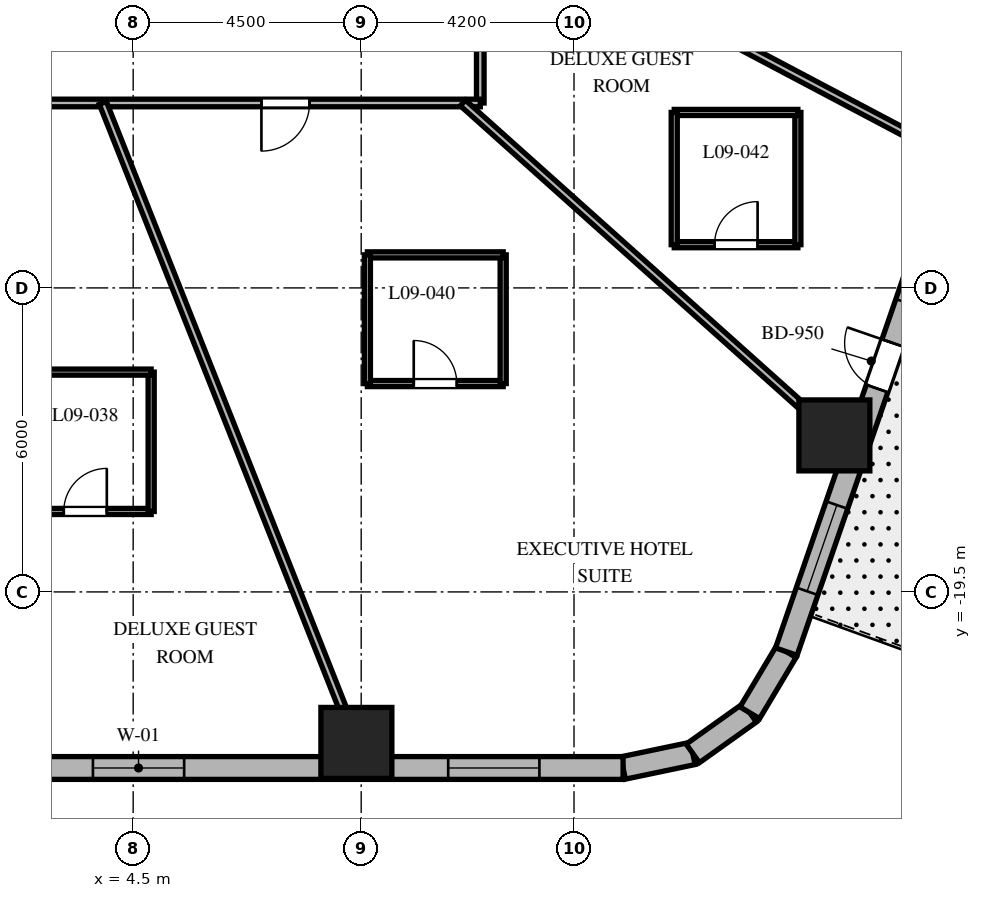
"""IFC4 building model, lengths in metres.
Left out: names, types, materials, properties, quantities, classifications, styles, units other than length and angle.
Written with IfcOpenShell. Run it as: python <this file> out.ifc"""

import sys

from ifc_helpers import new_model, si_unit, direction, frame, frame_2d, origin, origin_2d, place, context, subcontext, project, spatial, rectangle, extrude, element, fill, save


model = new_model("IFC4")
c1 = context("Model", 3, precision=1e-05, world=origin(), true_north=direction((0.0, 1.0)))
c2 = subcontext(c1, "Body", "Model", "MODEL_VIEW")
j1 = project(units=[si_unit("LENGTHUNIT", "METRE"), si_unit("PLANEANGLEUNIT", "RADIAN")], contexts=[c1])
p1 = place(None, origin())
s1 = spatial("IfcSite", under=j1, at=p1, CompositionType="ELEMENT")
p2 = place(p1, origin())
s2 = spatial("IfcBuilding", under=s1, at=p2, CompositionType="ELEMENT")
p3 = place(p2, frame((0.0, 0.0, 45.3)))
s3 = spatial("IfcBuildingStorey", under=s2, at=p3, CompositionType="ELEMENT", Elevation=45.3)
for number, where, z_axis, x_axis in (
    (1, (8.905, -22.48, 0.0), (0.0, 0.0, 1.0), (1.0, 0.0, 0.0)),
    (2, (18.338, -16.411, 0.0), (0.0, 0.0, 1.0), (1.0, 0.0, 0.0)),
):
    element("IfcColumn", number, at=place(p3, frame(where, z_axis=z_axis, x_axis=x_axis)), inside=s3, PredefinedType="COLUMN", context=c2, shape_type="SweptSolid", body=[
        extrude(rectangle(XDim=1.4, YDim=1.4, at=origin_2d()), origin(), (0.0, 0.0, 1.0), 3.7),
    ])
p4 = place(p3, frame((14.168, -22.975, 0.0), z_axis=(0.0, 0.0, 1.0), x_axis=(0.978770371074, 0.204959900243, 0.0)))
e3 = element("IfcWall", 3, at=p4, inside=s3, PredefinedType="SOLIDWALL", context=c2, shape_type="SweptSolid", body=[
    extrude(rectangle(XDim=1.406, YDim=0.45, at=frame_2d((0.703, 0.0))), origin(), (0.0, 0.0, 1.0), 3.4),
])
p5 = place(p3, frame((15.544, -22.687, 0.0), z_axis=(0.0, 0.0, 1.0), x_axis=(0.814210854316, 0.580569276412, 0.0)))
e4 = element("IfcWall", 4, at=p5, inside=s3, PredefinedType="SOLIDWALL", context=c2, shape_type="SweptSolid", body=[
    extrude(rectangle(XDim=1.381, YDim=0.45, at=frame_2d((0.691, 0.0))), origin(), (0.0, 0.0, 1.0), 3.4),
])
p6 = place(p3, frame((16.669, -21.885, 0.0), z_axis=(0.0, 0.0, 1.0), x_axis=(0.512936712947, 0.858426425799, 0.0)))
e5 = element("IfcWall", 5, at=p6, inside=s3, PredefinedType="SOLIDWALL", context=c2, shape_type="SweptSolid", body=[
    extrude(rectangle(XDim=1.406, YDim=0.45, at=frame_2d((0.703, 0.0))), origin(), (0.0, 0.0, 1.0), 3.4),
])
p7 = place(p3, frame((-12.221, -22.975, 0.0), z_axis=(0.0, 0.0, 1.0), x_axis=(1.0, 0.0, 0.0)))
e6 = element("IfcWall", 6, at=p7, inside=s3, PredefinedType="SOLIDWALL", context=c2, shape_type="SweptSolid", body=[
    extrude(rectangle(XDim=26.389, YDim=0.45, at=frame_2d((13.195, 0.0))), origin(), (0.0, 0.0, 1.0), 3.4),
])
p8 = place(p7, frame((1.653, 0.0, 0.8)))
e7 = element("IfcOpeningElement", 7, at=p8, cuts=e6, PredefinedType="OPENING", context=c2, shape_type="SweptSolid", body=[
    extrude(rectangle(XDim=1.8, YDim=1.8, at=frame_2d((0.9, 0.9))), frame((0.0, 0.235, 0.0), z_axis=(0.0, -1.0, 0.0), x_axis=(1.0, 0.0, 0.0)), (0.0, 0.0, 1.0), 0.47),
])
p9 = place(p7, frame((8.576, 0.0, 0.8)))
e8 = element("IfcOpeningElement", 8, at=p9, cuts=e6, PredefinedType="OPENING", context=c2, shape_type="SweptSolid", body=[
    extrude(rectangle(XDim=1.8, YDim=1.8, at=frame_2d((0.9, 0.9))), frame((0.0, 0.235, 0.0), z_axis=(0.0, -1.0, 0.0), x_axis=(1.0, 0.0, 0.0)), (0.0, 0.0, 1.0), 0.47),
])
p10 = place(p7, frame((15.927, 0.0, 0.8)))
e9 = element("IfcOpeningElement", 9, at=p10, cuts=e6, PredefinedType="OPENING", context=c2, shape_type="SweptSolid", body=[
    extrude(rectangle(XDim=1.8, YDim=1.8, at=frame_2d((0.9, 0.9))), frame((0.0, 0.235, 0.0), z_axis=(0.0, -1.0, 0.0), x_axis=(1.0, 0.0, 0.0)), (0.0, 0.0, 1.0), 0.47),
])
p11 = place(p7, frame((22.938, 0.0, 0.8)))
e10 = element("IfcOpeningElement", 10, at=p11, cuts=e6, PredefinedType="OPENING", context=c2, shape_type="SweptSolid", body=[
    extrude(rectangle(XDim=1.8, YDim=1.8, at=frame_2d((0.9, 0.9))), frame((0.0, 0.235, 0.0), z_axis=(0.0, -1.0, 0.0), x_axis=(1.0, 0.0, 0.0)), (0.0, 0.0, 1.0), 0.47),
])
p12 = place(p3, frame((17.39, -20.678, 0.0), z_axis=(0.0, 0.0, 1.0), x_axis=(0.326068018294, 0.945346310854, 0.0)))
e11 = element("IfcWall", 11, at=p12, inside=s3, PredefinedType="SOLIDWALL", context=c2, shape_type="SweptSolid", body=[
    extrude(rectangle(XDim=21.793, YDim=0.45, at=frame_2d((10.896, 0.0))), origin(), (0.0, 0.0, 1.0), 3.4),
])
p13 = place(p12, frame((5.493, 0.0, 0.0)))
e12 = element("IfcOpeningElement", 12, at=p13, cuts=e11, PredefinedType="OPENING", context=c2, shape_type="SweptSolid", body=[
    extrude(rectangle(XDim=0.95, YDim=2.15, at=frame_2d((0.475, 1.075))), frame((0.0, 0.235, 0.0), z_axis=(0.0, -1.0, 0.0), x_axis=(1.0, 0.0, 0.0)), (0.0, 0.0, 1.0), 0.47),
])
p14 = place(p12, frame((1.26, 0.0, 0.8)))
e13 = element("IfcOpeningElement", 13, at=p14, cuts=e11, PredefinedType="OPENING", context=c2, shape_type="SweptSolid", body=[
    extrude(rectangle(XDim=1.8, YDim=1.8, at=frame_2d((0.9, 0.9))), frame((0.0, 0.235, 0.0), z_axis=(0.0, -1.0, 0.0), x_axis=(1.0, 0.0, 0.0)), (0.0, 0.0, 1.0), 0.47),
])
p15 = place(p12, frame((7.283, 0.0, 0.8)))
e14 = element("IfcOpeningElement", 14, at=p15, cuts=e11, PredefinedType="OPENING", context=c2, shape_type="SweptSolid", body=[
    extrude(rectangle(XDim=1.8, YDim=1.8, at=frame_2d((0.9, 0.9))), frame((0.0, 0.235, 0.0), z_axis=(0.0, -1.0, 0.0), x_axis=(1.0, 0.0, 0.0)), (0.0, 0.0, 1.0), 0.47),
])
p16 = place(p12, frame((12.736, 0.0, 0.8)))
e15 = element("IfcOpeningElement", 15, at=p16, cuts=e11, PredefinedType="OPENING", context=c2, shape_type="SweptSolid", body=[
    extrude(rectangle(XDim=1.8, YDim=1.8, at=frame_2d((0.9, 0.9))), frame((0.0, 0.235, 0.0), z_axis=(0.0, -1.0, 0.0), x_axis=(1.0, 0.0, 0.0)), (0.0, 0.0, 1.0), 0.47),
])
p17 = place(p12, frame((18.68, 0.0, 0.8)))
e16 = element("IfcOpeningElement", 16, at=p17, cuts=e11, PredefinedType="OPENING", context=c2, shape_type="SweptSolid", body=[
    extrude(rectangle(XDim=1.8, YDim=1.8, at=frame_2d((0.9, 0.9))), frame((0.0, 0.235, 0.0), z_axis=(0.0, -1.0, 0.0), x_axis=(1.0, 0.0, 0.0)), (0.0, 0.0, 1.0), 0.47),
])
p18 = place(p3, frame((11.35, 9.85, 0.0), z_axis=(0.0, 0.0, 1.0), x_axis=(0.0, -1.0, 0.0)))
e17 = element("IfcWall", 17, at=p18, inside=s3, PredefinedType="PARTITIONING", context=c2, shape_type="SweptSolid", body=[
    extrude(rectangle(XDim=19.7, YDim=0.15, at=frame_2d((9.85, 0.0))), origin(), (0.0, 0.0, 1.0), 2.84),
])
p19 = place(p18, frame((7.571, 0.0, 0.0)))
e18 = element("IfcOpeningElement", 18, at=p19, cuts=e17, PredefinedType="OPENING", context=c2, shape_type="SweptSolid", body=[
    extrude(rectangle(XDim=0.95, YDim=2.03, at=frame_2d((0.475, 1.015))), frame((0.0, 0.085, 0.0), z_axis=(0.0, -1.0, 0.0), x_axis=(1.0, 0.0, 0.0)), (0.0, 0.0, 1.0), 0.17),
])
p20 = place(p18, frame((3.024, 0.0, 0.0)))
e19 = element("IfcOpeningElement", 19, at=p20, cuts=e17, PredefinedType="OPENING", context=c2, shape_type="SweptSolid", body=[
    extrude(rectangle(XDim=0.95, YDim=2.03, at=frame_2d((0.475, 1.015))), frame((0.0, 0.085, 0.0), z_axis=(0.0, -1.0, 0.0), x_axis=(1.0, 0.0, 0.0)), (0.0, 0.0, 1.0), 0.17),
])
p21 = place(p18, frame((17.181, 0.0, 0.0)))
e20 = element("IfcOpeningElement", 20, at=p21, cuts=e17, PredefinedType="OPENING", context=c2, shape_type="SweptSolid", body=[
    extrude(rectangle(XDim=0.95, YDim=2.03, at=frame_2d((0.475, 1.015))), frame((0.0, 0.085, 0.0), z_axis=(0.0, -1.0, 0.0), x_axis=(1.0, 0.0, 0.0)), (0.0, 0.0, 1.0), 0.17),
])
p22 = place(p18, frame((13.403, 0.0, 0.0)))
e21 = element("IfcOpeningElement", 21, at=p22, cuts=e17, PredefinedType="OPENING", context=c2, shape_type="SweptSolid", body=[
    extrude(rectangle(XDim=0.95, YDim=2.03, at=frame_2d((0.475, 1.015))), frame((0.0, 0.085, 0.0), z_axis=(0.0, -1.0, 0.0), x_axis=(1.0, 0.0, 0.0)), (0.0, 0.0, 1.0), 0.17),
])
p23 = place(p18, frame((10.134, 0.0, 0.0)))
e22 = element("IfcOpeningElement", 22, at=p23, cuts=e17, PredefinedType="OPENING", context=c2, shape_type="SweptSolid", body=[
    extrude(rectangle(XDim=0.95, YDim=2.03, at=frame_2d((0.475, 1.015))), frame((0.0, 0.085, 0.0), z_axis=(0.0, -1.0, 0.0), x_axis=(1.0, 0.0, 0.0)), (0.0, 0.0, 1.0), 0.17),
])
p24 = place(p3, frame((11.35, -9.85, 0.0), z_axis=(0.0, 0.0, 1.0), x_axis=(-1.0, 0.0, 0.0)))
e23 = element("IfcWall", 23, at=p24, inside=s3, PredefinedType="PARTITIONING", context=c2, shape_type="SweptSolid", body=[
    extrude(rectangle(XDim=22.7, YDim=0.15, at=frame_2d((11.35, 0.0))), origin(), (0.0, 0.0, 1.0), 2.84),
])
p25 = place(p24, frame((17.225, 0.0, 0.0)))
e24 = element("IfcOpeningElement", 24, at=p25, cuts=e23, PredefinedType="OPENING", context=c2, shape_type="SweptSolid", body=[
    extrude(rectangle(XDim=0.95, YDim=2.03, at=frame_2d((0.475, 1.015))), frame((0.0, 0.085, 0.0), z_axis=(0.0, -1.0, 0.0), x_axis=(1.0, 0.0, 0.0)), (0.0, 0.0, 1.0), 0.17),
])
p26 = place(p24, frame((12.214, 0.0, 0.0)))
e25 = element("IfcOpeningElement", 25, at=p26, cuts=e23, PredefinedType="OPENING", context=c2, shape_type="SweptSolid", body=[
    extrude(rectangle(XDim=0.95, YDim=2.03, at=frame_2d((0.475, 1.015))), frame((0.0, 0.085, 0.0), z_axis=(0.0, -1.0, 0.0), x_axis=(1.0, 0.0, 0.0)), (0.0, 0.0, 1.0), 0.17),
])
p27 = place(p24, frame((8.725, 0.0, 0.0)))
e26 = element("IfcOpeningElement", 26, at=p27, cuts=e23, PredefinedType="OPENING", context=c2, shape_type="SweptSolid", body=[
    extrude(rectangle(XDim=0.95, YDim=2.03, at=frame_2d((0.475, 1.015))), frame((0.0, 0.085, 0.0), z_axis=(0.0, -1.0, 0.0), x_axis=(1.0, 0.0, 0.0)), (0.0, 0.0, 1.0), 0.17),
])
p28 = place(p24, frame((3.369, 0.0, 0.0)))
e27 = element("IfcOpeningElement", 27, at=p28, cuts=e23, PredefinedType="OPENING", context=c2, shape_type="SweptSolid", body=[
    extrude(rectangle(XDim=0.95, YDim=2.03, at=frame_2d((0.475, 1.015))), frame((0.0, 0.085, 0.0), z_axis=(0.0, -1.0, 0.0), x_axis=(1.0, 0.0, 0.0)), (0.0, 0.0, 1.0), 0.17),
])
p29 = place(p3, frame((3.902, -9.85, 0.0), z_axis=(0.0, 0.0, 1.0), x_axis=(0.36828765711, -0.929711891728, 0.0)))
e28 = element("IfcWall", 28, at=p29, inside=s3, PredefinedType="PARTITIONING", context=c2, shape_type="SweptSolid", body=[
    extrude(rectangle(XDim=14.117, YDim=0.15, at=frame_2d((7.059, 0.0))), origin(), (0.0, 0.0, 1.0), 2.54),
])
p30 = place(p3, frame((11.007, -9.85, 0.0), z_axis=(0.0, 0.0, 1.0), x_axis=(0.745177305978, -0.666866390407, 0.0)))
e29 = element("IfcWall", 29, at=p30, inside=s3, PredefinedType="PARTITIONING", context=c2, shape_type="SweptSolid", body=[
    extrude(rectangle(XDim=10.375, YDim=0.15, at=frame_2d((5.188, 0.0))), origin(), (0.0, 0.0, 1.0), 2.54),
])
p31 = place(p3, frame((11.35, -6.001, 0.0), z_axis=(0.0, 0.0, 1.0), x_axis=(0.884022077319, -0.467445148453, 0.0)))
e30 = element("IfcWall", 30, at=p31, inside=s3, PredefinedType="PARTITIONING", context=c2, shape_type="SweptSolid", body=[
    extrude(rectangle(XDim=10.621, YDim=0.15, at=frame_2d((5.311, 0.0))), origin(), (0.0, 0.0, 1.0), 2.54),
])
p32 = place(p3, frame((2.255, -17.912, 0.0), z_axis=(0.0, 0.0, 1.0), x_axis=(1.0, 0.0, 0.0)))
e31 = element("IfcWall", 31, at=p32, inside=s3, PredefinedType="PARTITIONING", context=c2, shape_type="SweptSolid", body=[
    extrude(rectangle(XDim=2.6, YDim=0.12, at=frame_2d((1.3, 0.0))), origin(), (0.0, 0.0, 1.0), 3.4),
])
p33 = place(p32, frame((0.875, 0.0, 0.0)))
e32 = element("IfcOpeningElement", 32, at=p33, cuts=e31, PredefinedType="OPENING", context=c2, shape_type="SweptSolid", body=[
    extrude(rectangle(XDim=0.85, YDim=2.03, at=frame_2d((0.425, 1.015))), frame((0.0, 0.07, 0.0), z_axis=(0.0, -1.0, 0.0), x_axis=(1.0, 0.0, 0.0)), (0.0, 0.0, 1.0), 0.14),
])
p34 = place(p3, frame((4.855, -17.912, 0.0), z_axis=(0.0, 0.0, 1.0), x_axis=(0.0, 1.0, 0.0)))
e33 = element("IfcWall", 33, at=p34, inside=s3, PredefinedType="PARTITIONING", context=c2, shape_type="SweptSolid", body=[
    extrude(rectangle(XDim=2.75, YDim=0.12, at=frame_2d((1.375, 0.0))), origin(), (0.0, 0.0, 1.0), 2.84),
])
p35 = place(p3, frame((4.855, -15.162, 0.0), z_axis=(0.0, 0.0, 1.0), x_axis=(-1.0, 0.0, 0.0)))
e34 = element("IfcWall", 34, at=p35, inside=s3, PredefinedType="PARTITIONING", context=c2, shape_type="SweptSolid", body=[
    extrude(rectangle(XDim=2.6, YDim=0.12, at=frame_2d((1.3, 0.0))), origin(), (0.0, 0.0, 1.0), 3.4),
])
p36 = place(p3, frame((9.122, -15.388, 0.0), z_axis=(0.0, 0.0, 1.0), x_axis=(1.0, 0.0, 0.0)))
e35 = element("IfcWall", 35, at=p36, inside=s3, PredefinedType="PARTITIONING", context=c2, shape_type="SweptSolid", body=[
    extrude(rectangle(XDim=2.68, YDim=0.12, at=frame_2d((1.34, 0.0))), origin(), (0.0, 0.0, 1.0), 3.4),
])
p37 = place(p36, frame((0.915, 0.0, 0.0)))
e36 = element("IfcOpeningElement", 36, at=p37, cuts=e35, PredefinedType="OPENING", context=c2, shape_type="SweptSolid", body=[
    extrude(rectangle(XDim=0.85, YDim=2.03, at=frame_2d((0.425, 1.015))), frame((0.0, 0.07, 0.0), z_axis=(0.0, -1.0, 0.0), x_axis=(1.0, 0.0, 0.0)), (0.0, 0.0, 1.0), 0.14),
])
p38 = place(p3, frame((11.802, -15.388, 0.0), z_axis=(0.0, 0.0, 1.0), x_axis=(0.0, 1.0, 0.0)))
e37 = element("IfcWall", 37, at=p38, inside=s3, PredefinedType="PARTITIONING", context=c2, shape_type="SweptSolid", body=[
    extrude(rectangle(XDim=2.54, YDim=0.12, at=frame_2d((1.27, 0.0))), origin(), (0.0, 0.0, 1.0), 3.4),
])
p39 = place(p3, frame((11.802, -12.848, 0.0), z_axis=(0.0, 0.0, 1.0), x_axis=(-1.0, 0.0, 0.0)))
e38 = element("IfcWall", 38, at=p39, inside=s3, PredefinedType="PARTITIONING", context=c2, shape_type="SweptSolid", body=[
    extrude(rectangle(XDim=2.68, YDim=0.12, at=frame_2d((1.34, 0.0))), origin(), (0.0, 0.0, 1.0), 2.972),
])
p40 = place(p3, frame((9.122, -12.848, 0.0), z_axis=(0.0, 0.0, 1.0), x_axis=(0.0, -1.0, 0.0)))
e39 = element("IfcWall", 39, at=p40, inside=s3, PredefinedType="PARTITIONING", context=c2, shape_type="SweptSolid", body=[
    extrude(rectangle(XDim=2.54, YDim=0.12, at=frame_2d((1.27, 0.0))), origin(), (0.0, 0.0, 1.0), 2.84),
])
p41 = place(p3, frame((15.178, -12.647, 0.0), z_axis=(0.0, 0.0, 1.0), x_axis=(1.0, 0.0, 0.0)))
e40 = element("IfcWall", 40, at=p41, inside=s3, PredefinedType="PARTITIONING", context=c2, shape_type="SweptSolid", body=[
    extrude(rectangle(XDim=2.44, YDim=0.12, at=frame_2d((1.22, 0.0))), origin(), (0.0, 0.0, 1.0), 2.972),
])
p42 = place(p41, frame((0.795, 0.0, 0.0)))
e41 = element("IfcOpeningElement", 41, at=p42, cuts=e40, PredefinedType="OPENING", context=c2, shape_type="SweptSolid", body=[
    extrude(rectangle(XDim=0.85, YDim=2.03, at=frame_2d((0.425, 1.015))), frame((0.0, 0.07, 0.0), z_axis=(0.0, -1.0, 0.0), x_axis=(1.0, 0.0, 0.0)), (0.0, 0.0, 1.0), 0.14),
])
p43 = place(p3, frame((17.618, -12.647, 0.0), z_axis=(0.0, 0.0, 1.0), x_axis=(0.0, 1.0, 0.0)))
e42 = element("IfcWall", 42, at=p43, inside=s3, PredefinedType="PARTITIONING", context=c2, shape_type="SweptSolid", body=[
    extrude(rectangle(XDim=2.61, YDim=0.12, at=frame_2d((1.305, 0.0))), origin(), (0.0, 0.0, 1.0), 3.4),
])
p44 = place(p3, frame((17.618, -10.037, 0.0), z_axis=(0.0, 0.0, 1.0), x_axis=(-1.0, 0.0, 0.0)))
e43 = element("IfcWall", 43, at=p44, inside=s3, PredefinedType="PARTITIONING", context=c2, shape_type="SweptSolid", body=[
    extrude(rectangle(XDim=2.44, YDim=0.12, at=frame_2d((1.22, 0.0))), origin(), (0.0, 0.0, 1.0), 2.972),
])
p45 = place(p3, frame((15.178, -10.037, 0.0), z_axis=(0.0, 0.0, 1.0), x_axis=(0.0, -1.0, 0.0)))
e44 = element("IfcWall", 44, at=p45, inside=s3, PredefinedType="PARTITIONING", context=c2, shape_type="SweptSolid", body=[
    extrude(rectangle(XDim=2.61, YDim=0.12, at=frame_2d((1.305, 0.0))), origin(), (0.0, 0.0, 1.0), 3.4),
])
p46 = place(p10, origin())
e45 = element("IfcWindow", 45, at=p46, inside=s3, PartitioningType="SINGLE_PANEL", PredefinedType="WINDOW", context=c2, shape_type="SweptSolid", body=[
    extrude(rectangle(XDim=1.8, YDim=1.8, at=frame_2d((0.9, 0.9))), frame((0.0, 0.03, 0.0), z_axis=(0.0, -1.0, 0.0), x_axis=(1.0, 0.0, 0.0)), (0.0, 0.0, 1.0), 0.06),
])
fill(e9, e45)
p47 = place(p11, origin())
e46 = element("IfcWindow", 46, at=p47, inside=s3, PartitioningType="SINGLE_PANEL", PredefinedType="WINDOW", context=c2, shape_type="SweptSolid", body=[
    extrude(rectangle(XDim=1.8, YDim=1.8, at=frame_2d((0.9, 0.9))), frame((0.0, 0.03, 0.0), z_axis=(0.0, -1.0, 0.0), x_axis=(1.0, 0.0, 0.0)), (0.0, 0.0, 1.0), 0.06),
])
fill(e10, e46)
p48 = place(p13, origin())
e47 = element("IfcDoor", 47, at=p48, inside=s3, OperationType="SINGLE_SWING_RIGHT", PredefinedType="DOOR", context=c2, shape_type="SweptSolid", body=[
    extrude(rectangle(XDim=0.95, YDim=2.15, at=frame_2d((0.475, 1.075))), frame((0.0, 0.025, 0.0), z_axis=(0.0, -1.0, 0.0), x_axis=(1.0, 0.0, 0.0)), (0.0, 0.0, 1.0), 0.05),
])
fill(e12, e47)
p49 = place(p14, origin())
e48 = element("IfcWindow", 48, at=p49, inside=s3, PartitioningType="SINGLE_PANEL", PredefinedType="WINDOW", context=c2, shape_type="SweptSolid", body=[
    extrude(rectangle(XDim=1.8, YDim=1.8, at=frame_2d((0.9, 0.9))), frame((0.0, 0.03, 0.0), z_axis=(0.0, -1.0, 0.0), x_axis=(1.0, 0.0, 0.0)), (0.0, 0.0, 1.0), 0.06),
])
fill(e13, e48)
p50 = place(p33, origin())
e49 = element("IfcDoor", 49, at=p50, inside=s3, OperationType="SINGLE_SWING_RIGHT", PredefinedType="DOOR", context=c2, shape_type="SweptSolid", body=[
    extrude(rectangle(XDim=0.85, YDim=2.03, at=frame_2d((0.425, 1.015))), frame((0.0, 0.025, 0.0), z_axis=(0.0, -1.0, 0.0), x_axis=(1.0, 0.0, 0.0)), (0.0, 0.0, 1.0), 0.05),
])
fill(e32, e49)
p51 = place(p28, origin())
e50 = element("IfcDoor", 50, at=p51, inside=s3, OperationType="SINGLE_SWING_RIGHT", PredefinedType="DOOR", context=c2, shape_type="SweptSolid", body=[
    extrude(rectangle(XDim=0.95, YDim=2.03, at=frame_2d((0.475, 1.015))), frame((0.0, 0.025, 0.0), z_axis=(0.0, -1.0, 0.0), x_axis=(1.0, 0.0, 0.0)), (0.0, 0.0, 1.0), 0.05),
])
fill(e27, e50)
p52 = place(p37, origin())
e51 = element("IfcDoor", 51, at=p52, inside=s3, OperationType="SINGLE_SWING_LEFT", PredefinedType="DOOR", context=c2, shape_type="SweptSolid", body=[
    extrude(rectangle(XDim=0.85, YDim=2.03, at=frame_2d((0.425, 1.015))), frame((0.0, 0.025, 0.0), z_axis=(0.0, -1.0, 0.0), x_axis=(1.0, 0.0, 0.0)), (0.0, 0.0, 1.0), 0.05),
])
fill(e36, e51)
p53 = place(p42, origin())
e52 = element("IfcDoor", 52, at=p53, inside=s3, OperationType="SINGLE_SWING_RIGHT", PredefinedType="DOOR", context=c2, shape_type="SweptSolid", body=[
    extrude(rectangle(XDim=0.85, YDim=2.03, at=frame_2d((0.425, 1.015))), frame((0.0, 0.025, 0.0), z_axis=(0.0, -1.0, 0.0), x_axis=(1.0, 0.0, 0.0)), (0.0, 0.0, 1.0), 0.05),
])
fill(e41, e52)
save(model, sys.argv[1])
